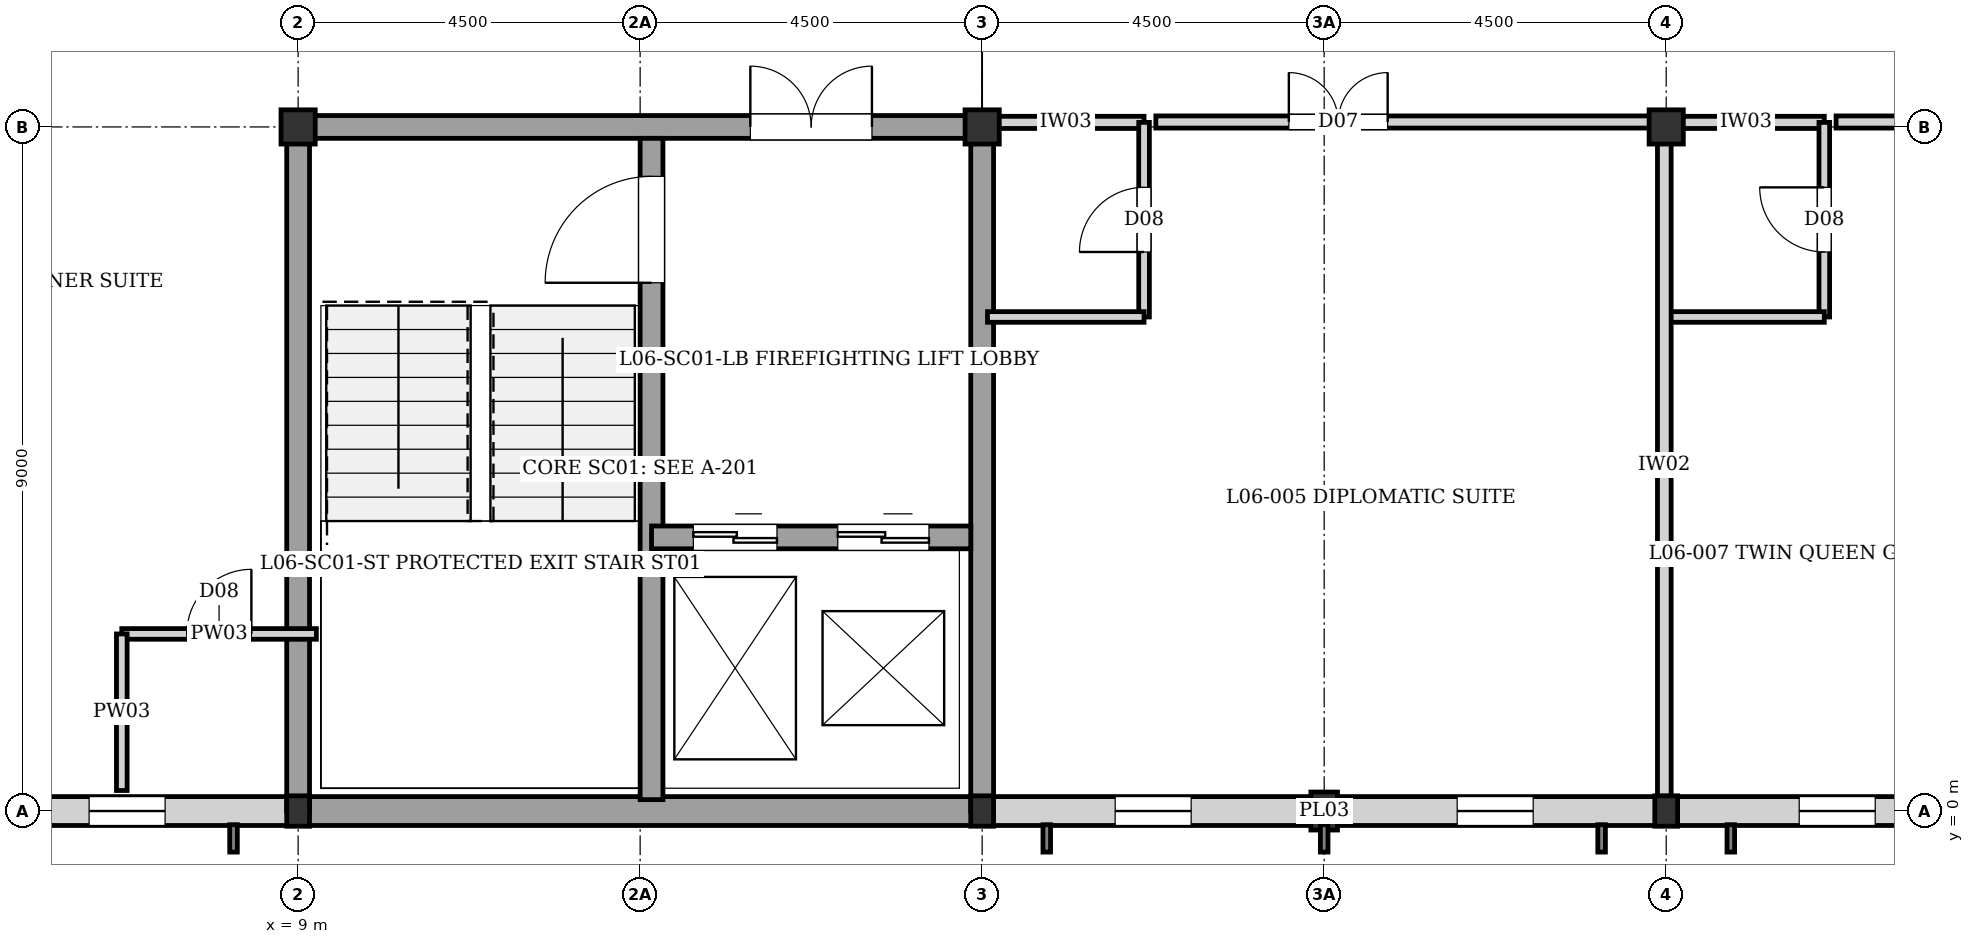
"""IFC4 building model, lengths in metres.
Left out: names, types, materials, properties, quantities, classifications, styles, units other than length and angle.
Written with IfcOpenShell. Run it as: python <this file> out.ifc"""

import sys

from ifc_helpers import new_model, si_unit, direction, frame, frame_2d, origin, origin_2d, place, context, subcontext, project, spatial, rectangle, i_section, extrude, element, fill, save


model = new_model("IFC4")
c1 = context("Model", 3, precision=1e-05, world=origin(), true_north=direction((0.0, 1.0)))
c2 = subcontext(c1, "Body", "Model", "MODEL_VIEW")
j1 = project(units=[si_unit("LENGTHUNIT", "METRE"), si_unit("PLANEANGLEUNIT", "RADIAN")], contexts=[c1])
p1 = place(None, origin())
s1 = spatial("IfcSite", under=j1, at=p1, CompositionType="ELEMENT")
p2 = place(p1, origin())
s2 = spatial("IfcBuilding", under=s1, at=p2, CompositionType="ELEMENT")
p3 = place(p2, frame((0.0, 0.0, 20.64)))
s3 = spatial("IfcBuildingStorey", under=s2, at=p3, CompositionType="ELEMENT", Elevation=20.64)
p4 = place(p3, frame((9.0, 0.0, 0.0), z_axis=(0.0, 0.0, 1.0), x_axis=(1.0, 0.0, 0.0)))
e1 = element("IfcColumn", 1, at=p4, inside=s3, PredefinedType="COLUMN", context=c2, shape_type="SweptSolid", body=[
    extrude(i_section(OverallWidth=0.3, OverallDepth=0.4, WebThickness=0.013, FlangeThickness=0.024, at=origin_2d()), origin(), (0.0, 0.0, 1.0), 3.04),
])
p5 = place(p3, frame((9.0, 9.0, 0.0), z_axis=(0.0, 0.0, 1.0), x_axis=(1.0, 0.0, 0.0)))
e2 = element("IfcColumn", 2, at=p5, inside=s3, PredefinedType="COLUMN", context=c2, shape_type="SweptSolid", body=[
    extrude(rectangle(XDim=0.45, YDim=0.45, at=origin_2d()), origin(), (0.0, 0.0, 1.0), 3.04),
])
p6 = place(p3, frame((18.0, 0.0, 0.0), z_axis=(0.0, 0.0, 1.0), x_axis=(1.0, 0.0, 0.0)))
e3 = element("IfcColumn", 3, at=p6, inside=s3, PredefinedType="COLUMN", context=c2, shape_type="SweptSolid", body=[
    extrude(i_section(OverallWidth=0.3, OverallDepth=0.4, WebThickness=0.013, FlangeThickness=0.024, at=origin_2d()), origin(), (0.0, 0.0, 1.0), 3.04),
])
p7 = place(p3, frame((18.0, 9.0, 0.0), z_axis=(0.0, 0.0, 1.0), x_axis=(1.0, 0.0, 0.0)))
e4 = element("IfcColumn", 4, at=p7, inside=s3, PredefinedType="COLUMN", context=c2, shape_type="SweptSolid", body=[
    extrude(rectangle(XDim=0.45, YDim=0.45, at=origin_2d()), origin(), (0.0, 0.0, 1.0), 3.04),
])
p8 = place(p3, frame((27.0, 0.0, 0.0), z_axis=(0.0, 0.0, 1.0), x_axis=(1.0, 0.0, 0.0)))
e5 = element("IfcColumn", 5, at=p8, inside=s3, PredefinedType="COLUMN", context=c2, shape_type="SweptSolid", body=[
    extrude(i_section(OverallWidth=0.3, OverallDepth=0.4, WebThickness=0.013, FlangeThickness=0.024, at=origin_2d()), origin(), (0.0, 0.0, 1.0), 3.04),
])
p9 = place(p3, frame((27.0, 9.0, 0.0), z_axis=(0.0, 0.0, 1.0), x_axis=(1.0, 0.0, 0.0)))
e6 = element("IfcColumn", 6, at=p9, inside=s3, PredefinedType="COLUMN", context=c2, shape_type="SweptSolid", body=[
    extrude(rectangle(XDim=0.45, YDim=0.45, at=origin_2d()), origin(), (0.0, 0.0, 1.0), 3.04),
])
p10 = place(p3, frame((22.5, 0.0, 0.0), z_axis=(0.0, 0.0, 1.0), x_axis=(1.0, 0.0, 0.0)))
e7 = element("IfcColumn", 7, at=p10, inside=s3, PredefinedType="PILASTER", context=c2, shape_type="SweptSolid", body=[
    extrude(rectangle(XDim=0.35, YDim=0.5, at=origin_2d()), origin(), (0.0, 0.0, 1.0), 3.04),
])
p11 = place(p3, frame((35.87, 0.0, 0.0), z_axis=(0.0, 0.0, 1.0), x_axis=(-1.0, 0.0, 0.0)))
e8 = element("IfcWall", 8, at=p11, inside=s3, PredefinedType="SOLIDWALL", context=c2, shape_type="SweptSolid", body=[
    extrude(rectangle(XDim=8.87, YDim=0.38, at=frame_2d((4.435, 0.0))), origin(), (0.0, 0.0, 1.0), 2.38),
])
p12 = place(p11, frame((1.62, 0.0, 0.35)))
e9 = element("IfcOpeningElement", 9, at=p12, cuts=e8, PredefinedType="OPENING", context=c2, shape_type="SweptSolid", body=[
    extrude(rectangle(XDim=1.0, YDim=1.6, at=frame_2d((0.5, 0.8))), frame((0.0, 0.2, 0.0), z_axis=(0.0, -1.0, 0.0), x_axis=(1.0, 0.0, 0.0)), (0.0, 0.0, 1.0), 0.4),
])
p13 = place(p11, frame((6.12, 0.0, 0.35)))
e10 = element("IfcOpeningElement", 10, at=p13, cuts=e8, PredefinedType="OPENING", context=c2, shape_type="SweptSolid", body=[
    extrude(rectangle(XDim=1.0, YDim=1.6, at=frame_2d((0.5, 0.8))), frame((0.0, 0.2, 0.0), z_axis=(0.0, -1.0, 0.0), x_axis=(1.0, 0.0, 0.0)), (0.0, 0.0, 1.0), 0.4),
])
p14 = place(p3, frame((27.0, 0.0, 0.0), z_axis=(0.0, 0.0, 1.0), x_axis=(-1.0, 0.0, 0.0)))
e11 = element("IfcWall", 11, at=p14, inside=s3, PredefinedType="SOLIDWALL", context=c2, shape_type="SweptSolid", body=[
    extrude(rectangle(XDim=8.87, YDim=0.38, at=frame_2d((4.435, 0.0))), origin(), (0.0, 0.0, 1.0), 2.42),
])
p15 = place(p14, frame((1.75, 0.0, 0.35)))
e12 = element("IfcOpeningElement", 12, at=p15, cuts=e11, PredefinedType="OPENING", context=c2, shape_type="SweptSolid", body=[
    extrude(rectangle(XDim=1.0, YDim=1.6, at=frame_2d((0.5, 0.8))), frame((0.0, 0.2, 0.0), z_axis=(0.0, -1.0, 0.0), x_axis=(1.0, 0.0, 0.0)), (0.0, 0.0, 1.0), 0.4),
])
p16 = place(p14, frame((6.25, 0.0, 0.35)))
e13 = element("IfcOpeningElement", 13, at=p16, cuts=e11, PredefinedType="OPENING", context=c2, shape_type="SweptSolid", body=[
    extrude(rectangle(XDim=1.0, YDim=1.6, at=frame_2d((0.5, 0.8))), frame((0.0, 0.2, 0.0), z_axis=(0.0, -1.0, 0.0), x_axis=(1.0, 0.0, 0.0)), (0.0, 0.0, 1.0), 0.4),
])
p17 = place(p3, frame((18.0, 0.0, 0.0), z_axis=(0.0, 0.0, 1.0), x_axis=(-1.0, 0.0, 0.0)))
e14 = element("IfcWall", 14, at=p17, inside=s3, PredefinedType="SOLIDWALL", context=c2, shape_type="SweptSolid", body=[
    extrude(rectangle(XDim=9.0, YDim=0.38, at=frame_2d((4.5, 0.0))), origin(), (0.0, 0.0, 1.0), 2.82),
])
p18 = place(p3, frame((8.87, 0.0, 0.0), z_axis=(0.0, 0.0, 1.0), x_axis=(-1.0, 0.0, 0.0)))
e15 = element("IfcWall", 15, at=p18, inside=s3, PredefinedType="SOLIDWALL", context=c2, shape_type="SweptSolid", body=[
    extrude(rectangle(XDim=8.87, YDim=0.38, at=frame_2d((4.435, 0.0))), origin(), (0.0, 0.0, 1.0), 2.55),
])
p19 = place(p18, frame((1.62, 0.0, 0.35)))
e16 = element("IfcOpeningElement", 16, at=p19, cuts=e15, PredefinedType="OPENING", context=c2, shape_type="SweptSolid", body=[
    extrude(rectangle(XDim=1.0, YDim=1.6, at=frame_2d((0.5, 0.8))), frame((0.0, 0.2, 0.0), z_axis=(0.0, -1.0, 0.0), x_axis=(1.0, 0.0, 0.0)), (0.0, 0.0, 1.0), 0.4),
])
p20 = place(p18, frame((6.12, 0.0, 0.35)))
e17 = element("IfcOpeningElement", 17, at=p20, cuts=e15, PredefinedType="OPENING", context=c2, shape_type="SweptSolid", body=[
    extrude(rectangle(XDim=1.0, YDim=1.6, at=frame_2d((0.5, 0.8))), frame((0.0, 0.2, 0.0), z_axis=(0.0, -1.0, 0.0), x_axis=(1.0, 0.0, 0.0)), (0.0, 0.0, 1.0), 0.4),
])
p21 = place(p3, frame((18.0, 0.0, 0.0), z_axis=(0.0, 0.0, 1.0), x_axis=(0.0, 1.0, 0.0)))
e18 = element("IfcWall", 18, at=p21, inside=s3, PredefinedType="SHEAR", context=c2, shape_type="SweptSolid", body=[
    extrude(rectangle(XDim=9.0, YDim=0.3, at=frame_2d((4.5, 0.0))), origin(), (0.0, 0.0, 1.0), 2.82),
])
p22 = place(p3, frame((9.0, 9.0, 0.0), z_axis=(0.0, 0.0, 1.0), x_axis=(1.0, 0.0, 0.0)))
e19 = element("IfcWall", 19, at=p22, inside=s3, PredefinedType="SHEAR", context=c2, shape_type="SweptSolid", body=[
    extrude(rectangle(XDim=9.0, YDim=0.3, at=frame_2d((4.5, 0.0))), origin(), (0.0, 0.0, 1.0), 2.82),
])
p23 = place(p22, frame((5.95, 0.0, 0.0)))
e20 = element("IfcOpeningElement", 20, at=p23, cuts=e19, PredefinedType="OPENING", context=c2, shape_type="SweptSolid", body=[
    extrude(rectangle(XDim=1.6, YDim=2.1, at=frame_2d((0.8, 1.05))), frame((0.0, 0.16, 0.0), z_axis=(0.0, -1.0, 0.0), x_axis=(1.0, 0.0, 0.0)), (0.0, 0.0, 1.0), 0.32),
])
p24 = place(p3, frame((9.0, 0.0, 0.0), z_axis=(0.0, 0.0, 1.0), x_axis=(0.0, 1.0, 0.0)))
e21 = element("IfcWall", 21, at=p24, inside=s3, PredefinedType="SHEAR", context=c2, shape_type="SweptSolid", body=[
    extrude(rectangle(XDim=9.0, YDim=0.3, at=frame_2d((4.5, 0.0))), origin(), (0.0, 0.0, 1.0), 2.82),
])
p25 = place(p3, frame((13.65, 0.15, 0.0), z_axis=(0.0, 0.0, 1.0), x_axis=(0.0, 1.0, 0.0)))
e22 = element("IfcWall", 22, at=p25, inside=s3, PredefinedType="SHEAR", context=c2, shape_type="SweptSolid", body=[
    extrude(rectangle(XDim=8.7, YDim=0.3, at=frame_2d((4.35, 0.0))), origin(), (0.0, 0.0, 1.0), 2.82),
])
p26 = place(p25, frame((6.8, 0.0, 0.0)))
e23 = element("IfcOpeningElement", 23, at=p26, cuts=e22, PredefinedType="OPENING", context=c2, shape_type="SweptSolid", body=[
    extrude(rectangle(XDim=1.4, YDim=2.02, at=frame_2d((0.7, 1.01))), frame((0.0, 0.16, 0.0), z_axis=(0.0, -1.0, 0.0), x_axis=(1.0, 0.0, 0.0)), (0.0, 0.0, 1.0), 0.32),
])
p27 = place(p3, frame((13.65, 3.6, 0.0), z_axis=(0.0, 0.0, 1.0), x_axis=(1.0, 0.0, 0.0)))
e24 = element("IfcWall", 24, at=p27, inside=s3, PredefinedType="SHEAR", context=c2, shape_type="SweptSolid", body=[
    extrude(rectangle(XDim=4.2, YDim=0.3, at=frame_2d((2.1, 0.0))), origin(), (0.0, 0.0, 1.0), 2.82),
])
p28 = place(p27, frame((0.55, 0.0, 0.0)))
e25 = element("IfcOpeningElement", 25, at=p28, cuts=e24, PredefinedType="OPENING", context=c2, shape_type="SweptSolid", body=[
    extrude(rectangle(XDim=1.1, YDim=2.1, at=frame_2d((0.55, 1.05))), frame((0.0, 0.16, 0.0), z_axis=(0.0, -1.0, 0.0), x_axis=(1.0, 0.0, 0.0)), (0.0, 0.0, 1.0), 0.32),
])
p29 = place(p27, frame((2.45, 0.0, 0.0)))
e26 = element("IfcOpeningElement", 26, at=p29, cuts=e24, PredefinedType="OPENING", context=c2, shape_type="SweptSolid", body=[
    extrude(rectangle(XDim=1.2, YDim=2.2, at=frame_2d((0.6, 1.1))), frame((0.0, 0.16, 0.0), z_axis=(0.0, -1.0, 0.0), x_axis=(1.0, 0.0, 0.0)), (0.0, 0.0, 1.0), 0.32),
])
p30 = place(p3, frame((6.68, 2.33, 0.0), z_axis=(0.0, 0.0, 1.0), x_axis=(1.0, 0.0, 0.0)))
e27 = element("IfcWall", 27, at=p30, inside=s3, PredefinedType="PLUMBINGWALL", context=c2, shape_type="SweptSolid", body=[
    extrude(rectangle(XDim=2.56, YDim=0.14, at=frame_2d((1.28, 0.0))), origin(), (0.0, 0.0, 1.0), 2.82),
])
p31 = place(p30, frame((0.855, 0.0, 0.0)))
e28 = element("IfcOpeningElement", 28, at=p31, cuts=e27, PredefinedType="OPENING", context=c2, shape_type="SweptSolid", body=[
    extrude(rectangle(XDim=0.85, YDim=2.04, at=frame_2d((0.425, 1.02))), frame((0.0, 0.08, 0.0), z_axis=(0.0, -1.0, 0.0), x_axis=(1.0, 0.0, 0.0)), (0.0, 0.0, 1.0), 0.16),
])
p32 = place(p3, frame((6.68, 0.27, 0.0), z_axis=(0.0, 0.0, 1.0), x_axis=(0.0, 1.0, 0.0)))
e29 = element("IfcWall", 29, at=p32, inside=s3, PredefinedType="PLUMBINGWALL", context=c2, shape_type="SweptSolid", body=[
    extrude(rectangle(XDim=2.06, YDim=0.14, at=frame_2d((1.03, 0.0))), origin(), (0.0, 0.0, 1.0), 2.82),
])
p33 = place(p3, frame((18.07, 9.06, 0.0), z_axis=(0.0, 0.0, 1.0), x_axis=(1.0, 0.0, 0.0)))
e30 = element("IfcWall", 30, at=p33, inside=s3, PredefinedType="PARTITIONING", context=c2, shape_type="SweptSolid", body=[
    extrude(rectangle(XDim=2.06, YDim=0.16, at=frame_2d((1.03, 0.0))), origin(), (0.0, 0.0, 1.0), 2.29),
])
p34 = place(p3, frame((20.13, 6.5, 0.0), z_axis=(0.0, 0.0, 1.0), x_axis=(0.0, 1.0, 0.0)))
e31 = element("IfcWall", 31, at=p34, inside=s3, PredefinedType="PLUMBINGWALL", context=c2, shape_type="SweptSolid", body=[
    extrude(rectangle(XDim=2.56, YDim=0.14, at=frame_2d((1.28, 0.0))), origin(), (0.0, 0.0, 1.0), 2.82),
])
p35 = place(p34, frame((0.855, 0.0, 0.0)))
e32 = element("IfcOpeningElement", 32, at=p35, cuts=e31, PredefinedType="OPENING", context=c2, shape_type="SweptSolid", body=[
    extrude(rectangle(XDim=0.85, YDim=2.04, at=frame_2d((0.425, 1.02))), frame((0.0, 0.08, 0.0), z_axis=(0.0, -1.0, 0.0), x_axis=(1.0, 0.0, 0.0)), (0.0, 0.0, 1.0), 0.16),
])
p36 = place(p3, frame((18.07, 6.5, 0.0), z_axis=(0.0, 0.0, 1.0), x_axis=(1.0, 0.0, 0.0)))
e33 = element("IfcWall", 33, at=p36, inside=s3, PredefinedType="PLUMBINGWALL", context=c2, shape_type="SweptSolid", body=[
    extrude(rectangle(XDim=2.06, YDim=0.14, at=frame_2d((1.03, 0.0))), origin(), (0.0, 0.0, 1.0), 2.82),
])
p37 = place(p3, frame((27.02, 9.06, 0.0), z_axis=(0.0, 0.0, 1.0), x_axis=(1.0, 0.0, 0.0)))
e34 = element("IfcWall", 34, at=p37, inside=s3, PredefinedType="PARTITIONING", context=c2, shape_type="SweptSolid", body=[
    extrude(rectangle(XDim=2.06, YDim=0.16, at=frame_2d((1.03, 0.0))), origin(), (0.0, 0.0, 1.0), 2.42),
])
p38 = place(p3, frame((29.08, 6.5, 0.0), z_axis=(0.0, 0.0, 1.0), x_axis=(0.0, 1.0, 0.0)))
e35 = element("IfcWall", 35, at=p38, inside=s3, PredefinedType="PLUMBINGWALL", context=c2, shape_type="SweptSolid", body=[
    extrude(rectangle(XDim=2.56, YDim=0.14, at=frame_2d((1.28, 0.0))), origin(), (0.0, 0.0, 1.0), 2.82),
])
p39 = place(p38, frame((0.855, 0.0, 0.0)))
e36 = element("IfcOpeningElement", 36, at=p39, cuts=e35, PredefinedType="OPENING", context=c2, shape_type="SweptSolid", body=[
    extrude(rectangle(XDim=0.85, YDim=2.04, at=frame_2d((0.425, 1.02))), frame((0.0, 0.08, 0.0), z_axis=(0.0, -1.0, 0.0), x_axis=(1.0, 0.0, 0.0)), (0.0, 0.0, 1.0), 0.16),
])
p40 = place(p3, frame((27.02, 6.5, 0.0), z_axis=(0.0, 0.0, 1.0), x_axis=(1.0, 0.0, 0.0)))
e37 = element("IfcWall", 37, at=p40, inside=s3, PredefinedType="PLUMBINGWALL", context=c2, shape_type="SweptSolid", body=[
    extrude(rectangle(XDim=2.06, YDim=0.14, at=frame_2d((1.03, 0.0))), origin(), (0.0, 0.0, 1.0), 2.82),
])
p41 = place(p3, frame((26.975, 0.195, 0.0), z_axis=(0.0, 0.0, 1.0), x_axis=(0.0, 1.0, 0.0)))
e38 = element("IfcWall", 38, at=p41, inside=s3, PredefinedType="PARTITIONING", context=c2, shape_type="SweptSolid", body=[
    extrude(rectangle(XDim=8.71, YDim=0.18, at=frame_2d((4.355, 0.0))), origin(), (0.0, 0.0, 1.0), 2.29),
])
p42 = place(p3, frame((20.285, 9.065, 0.0), z_axis=(0.0, 0.0, 1.0), x_axis=(1.0, 0.0, 0.0)))
e39 = element("IfcWall", 39, at=p42, inside=s3, PredefinedType="PARTITIONING", context=c2, shape_type="SweptSolid", body=[
    extrude(rectangle(XDim=6.535, YDim=0.16, at=frame_2d((3.268, 0.0))), origin(), (0.0, 0.0, 1.0), 2.29),
])
p43 = place(p42, frame((1.75, 0.0, 0.0)))
e40 = element("IfcOpeningElement", 40, at=p43, cuts=e39, PredefinedType="OPENING", context=c2, shape_type="SweptSolid", body=[
    extrude(rectangle(XDim=1.3, YDim=2.25, at=frame_2d((0.65, 1.125))), frame((0.0, 0.09, 0.0), z_axis=(0.0, -1.0, 0.0), x_axis=(1.0, 0.0, 0.0)), (0.0, 0.0, 1.0), 0.18),
])
p44 = place(p3, frame((29.235, 9.065, 0.0), z_axis=(0.0, 0.0, 1.0), x_axis=(1.0, 0.0, 0.0)))
e41 = element("IfcWall", 41, at=p44, inside=s3, PredefinedType="PARTITIONING", context=c2, shape_type="SweptSolid", body=[
    extrude(rectangle(XDim=2.11, YDim=0.16, at=frame_2d((1.055, 0.0))), origin(), (0.0, 0.0, 1.0), 2.42),
])
p45 = place(p44, frame((0.833, 0.0, 0.0)))
e42 = element("IfcOpeningElement", 42, at=p45, cuts=e41, PredefinedType="OPENING", context=c2, shape_type="SweptSolid", body=[
    extrude(rectangle(XDim=0.95, YDim=2.15, at=frame_2d((0.475, 1.075))), frame((0.0, 0.09, 0.0), z_axis=(0.0, -1.0, 0.0), x_axis=(1.0, 0.0, 0.0)), (0.0, 0.0, 1.0), 0.18),
])
p46 = place(p13, origin())
e43 = element("IfcWindow", 43, at=p46, inside=s3, PartitioningType="SINGLE_PANEL", PredefinedType="WINDOW", context=c2, shape_type="SweptSolid", body=[
    extrude(rectangle(XDim=1.0, YDim=1.6, at=frame_2d((0.5, 0.8))), frame((0.0, 0.03, 0.0), z_axis=(0.0, -1.0, 0.0), x_axis=(1.0, 0.0, 0.0)), (0.0, 0.0, 1.0), 0.06),
])
fill(e10, e43)
p47 = place(p15, origin())
e44 = element("IfcWindow", 44, at=p47, inside=s3, PartitioningType="SINGLE_PANEL", PredefinedType="WINDOW", context=c2, shape_type="SweptSolid", body=[
    extrude(rectangle(XDim=1.0, YDim=1.6, at=frame_2d((0.5, 0.8))), frame((0.0, 0.03, 0.0), z_axis=(0.0, -1.0, 0.0), x_axis=(1.0, 0.0, 0.0)), (0.0, 0.0, 1.0), 0.06),
])
fill(e12, e44)
p48 = place(p16, origin())
e45 = element("IfcWindow", 45, at=p48, inside=s3, PartitioningType="SINGLE_PANEL", PredefinedType="WINDOW", context=c2, shape_type="SweptSolid", body=[
    extrude(rectangle(XDim=1.0, YDim=1.6, at=frame_2d((0.5, 0.8))), frame((0.0, 0.03, 0.0), z_axis=(0.0, -1.0, 0.0), x_axis=(1.0, 0.0, 0.0)), (0.0, 0.0, 1.0), 0.06),
])
fill(e13, e45)
p49 = place(p19, origin())
e46 = element("IfcWindow", 46, at=p49, inside=s3, PartitioningType="SINGLE_PANEL", PredefinedType="WINDOW", context=c2, shape_type="SweptSolid", body=[
    extrude(rectangle(XDim=1.0, YDim=1.6, at=frame_2d((0.5, 0.8))), frame((0.0, 0.03, 0.0), z_axis=(0.0, -1.0, 0.0), x_axis=(1.0, 0.0, 0.0)), (0.0, 0.0, 1.0), 0.06),
])
fill(e16, e46)
p50 = place(p23, origin())
e47 = element("IfcDoor", 47, at=p50, inside=s3, OperationType="DOUBLE_DOOR_SINGLE_SWING", PredefinedType="DOOR", context=c2, shape_type="SweptSolid", body=[
    extrude(rectangle(XDim=1.6, YDim=2.1, at=frame_2d((0.8, 1.05))), frame((0.0, 0.025, 0.0), z_axis=(0.0, -1.0, 0.0), x_axis=(1.0, 0.0, 0.0)), (0.0, 0.0, 1.0), 0.05),
])
fill(e20, e47)
p51 = place(p26, origin())
e48 = element("IfcDoor", 48, at=p51, inside=s3, OperationType="SINGLE_SWING_LEFT", PredefinedType="DOOR", context=c2, shape_type="SweptSolid", body=[
    extrude(rectangle(XDim=1.4, YDim=2.02, at=frame_2d((0.7, 1.01))), frame((0.0, 0.025, 0.0), z_axis=(0.0, -1.0, 0.0), x_axis=(1.0, 0.0, 0.0)), (0.0, 0.0, 1.0), 0.05),
])
fill(e23, e48)
p52 = place(p28, origin())
e49 = element("IfcDoor", 49, at=p52, inside=s3, OperationType="DOUBLE_DOOR_SLIDING", PredefinedType="DOOR", context=c2, shape_type="SweptSolid", body=[
    extrude(rectangle(XDim=1.1, YDim=2.1, at=frame_2d((0.55, 1.05))), frame((0.0, 0.025, 0.0), z_axis=(0.0, -1.0, 0.0), x_axis=(1.0, 0.0, 0.0)), (0.0, 0.0, 1.0), 0.05),
])
fill(e25, e49)
p53 = place(p29, origin())
e50 = element("IfcDoor", 50, at=p53, inside=s3, OperationType="DOUBLE_DOOR_SLIDING", PredefinedType="DOOR", context=c2, shape_type="SweptSolid", body=[
    extrude(rectangle(XDim=1.2, YDim=2.2, at=frame_2d((0.6, 1.1))), frame((0.0, 0.025, 0.0), z_axis=(0.0, -1.0, 0.0), x_axis=(1.0, 0.0, 0.0)), (0.0, 0.0, 1.0), 0.05),
])
fill(e26, e50)
p54 = place(p31, origin())
e51 = element("IfcDoor", 51, at=p54, inside=s3, OperationType="SINGLE_SWING_RIGHT", PredefinedType="DOOR", context=c2, shape_type="SweptSolid", body=[
    extrude(rectangle(XDim=0.85, YDim=2.04, at=frame_2d((0.425, 1.02))), frame((0.0, 0.025, 0.0), z_axis=(0.0, -1.0, 0.0), x_axis=(1.0, 0.0, 0.0)), (0.0, 0.0, 1.0), 0.05),
])
fill(e28, e51)
p55 = place(p35, origin())
e52 = element("IfcDoor", 52, at=p55, inside=s3, OperationType="SINGLE_SWING_LEFT", PredefinedType="DOOR", context=c2, shape_type="SweptSolid", body=[
    extrude(rectangle(XDim=0.85, YDim=2.04, at=frame_2d((0.425, 1.02))), frame((0.0, 0.025, 0.0), z_axis=(0.0, -1.0, 0.0), x_axis=(1.0, 0.0, 0.0)), (0.0, 0.0, 1.0), 0.05),
])
fill(e32, e52)
p56 = place(p39, origin())
e53 = element("IfcDoor", 53, at=p56, inside=s3, OperationType="SINGLE_SWING_RIGHT", PredefinedType="DOOR", context=c2, shape_type="SweptSolid", body=[
    extrude(rectangle(XDim=0.85, YDim=2.04, at=frame_2d((0.425, 1.02))), frame((0.0, 0.025, 0.0), z_axis=(0.0, -1.0, 0.0), x_axis=(1.0, 0.0, 0.0)), (0.0, 0.0, 1.0), 0.05),
])
fill(e36, e53)
p57 = place(p43, origin())
e54 = element("IfcDoor", 54, at=p57, inside=s3, OperationType="DOUBLE_DOOR_SINGLE_SWING", PredefinedType="DOOR", context=c2, shape_type="SweptSolid", body=[
    extrude(rectangle(XDim=1.3, YDim=2.25, at=frame_2d((0.65, 1.125))), frame((0.0, 0.025, 0.0), z_axis=(0.0, -1.0, 0.0), x_axis=(1.0, 0.0, 0.0)), (0.0, 0.0, 1.0), 0.05),
])
fill(e40, e54)
save(model, sys.argv[1])
